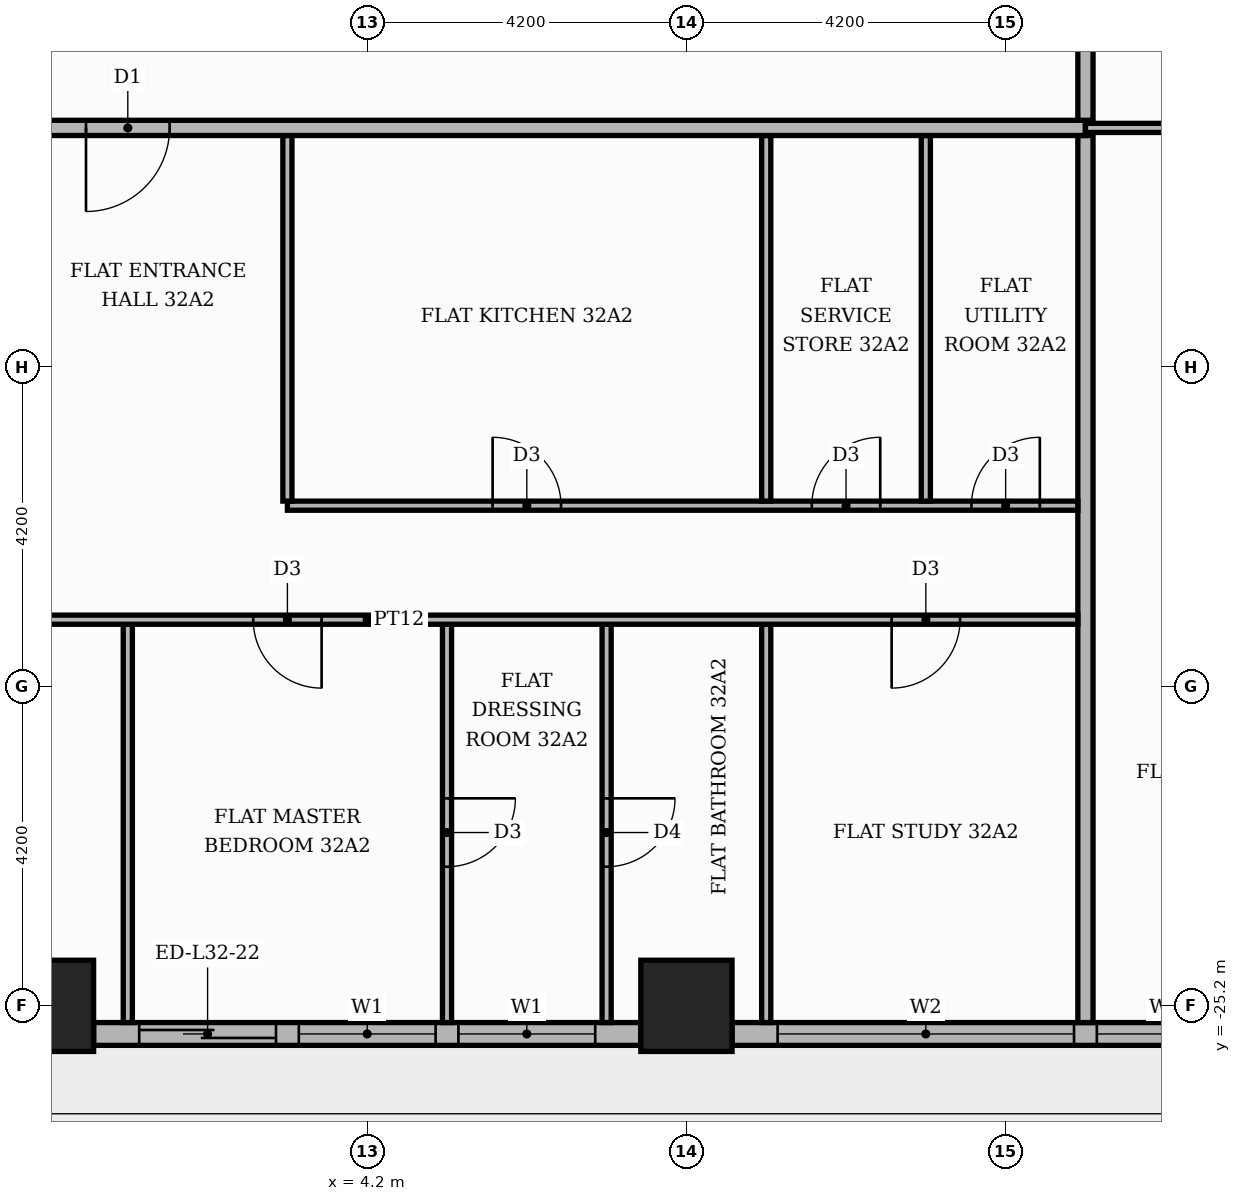
"""IFC4 building model, lengths in metres.
Left out: names, types, materials, properties, quantities, classifications, styles, units other than length and angle.
Written with IfcOpenShell. Run it as: python <this file> out.ifc"""

import sys

from ifc_helpers import new_model, si_unit, direction, frame, frame_2d, origin, origin_2d, place, context, subcontext, project, spatial, rectangle, extrude, element, fill, save


model = new_model("IFC4")
c1 = context("Model", 3, precision=1e-05, world=origin(), true_north=direction((0.0, 1.0)))
c2 = subcontext(c1, "Body", "Model", "MODEL_VIEW")
j1 = project(units=[si_unit("LENGTHUNIT", "METRE"), si_unit("PLANEANGLEUNIT", "RADIAN")], contexts=[c1])
p1 = place(None, origin())
s1 = spatial("IfcSite", under=j1, at=p1, CompositionType="ELEMENT")
p2 = place(p1, origin())
s2 = spatial("IfcBuilding", under=s1, at=p2, CompositionType="ELEMENT")
p3 = place(p2, frame((0.0, 0.0, 137.7)))
s3 = spatial("IfcBuildingStorey", under=s2, at=p3, CompositionType="ELEMENT", Elevation=137.7)
for number, where, z_axis, x_axis in (
    (1, (0.0, -25.2, 0.0), (0.0, 0.0, 1.0), (1.0, 0.0, 0.0)),
    (2, (8.4, -25.2, 0.0), (0.0, 0.0, 1.0), (1.0, 0.0, 0.0)),
):
    element("IfcColumn", number, at=place(p3, frame(where, z_axis=z_axis, x_axis=x_axis)), inside=s3, PredefinedType="COLUMN", context=c2, shape_type="SweptSolid", body=[
        extrude(rectangle(XDim=1.2, YDim=1.2, at=origin_2d()), origin(), (0.0, 0.0, 1.0), 3.9),
    ])
p4 = place(p3, frame((0.6, -25.57, 0.0), z_axis=(0.0, 0.0, 1.0), x_axis=(1.0, 0.0, 0.0)))
e3 = element("IfcWall", 3, at=p4, inside=s3, PredefinedType="STANDARD", context=c2, shape_type="SweptSolid", body=[
    extrude(rectangle(XDim=7.2, YDim=0.3, at=frame_2d((3.6, 0.0))), origin(), (0.0, 0.0, 1.0), 3.48),
])
p5 = place(p4, frame((0.6, 0.0, 0.0)))
e4 = element("IfcOpeningElement", 4, at=p5, cuts=e3, PredefinedType="OPENING", context=c2, shape_type="SweptSolid", body=[
    extrude(rectangle(XDim=1.8, YDim=2.4, at=frame_2d((0.9, 1.2))), frame((0.0, 0.16, 0.0), z_axis=(0.0, -1.0, 0.0), x_axis=(1.0, 0.0, 0.0)), (0.0, 0.0, 1.0), 0.32),
])
p6 = place(p4, frame((2.7, 0.0, 0.9)))
e5 = element("IfcOpeningElement", 5, at=p6, cuts=e3, PredefinedType="OPENING", context=c2, shape_type="SweptSolid", body=[
    extrude(rectangle(XDim=1.8, YDim=2.1, at=frame_2d((0.9, 1.05))), frame((0.0, 0.16, 0.0), z_axis=(0.0, -1.0, 0.0), x_axis=(1.0, 0.0, 0.0)), (0.0, 0.0, 1.0), 0.32),
])
p7 = place(p4, frame((4.8, 0.0, 0.9)))
e6 = element("IfcOpeningElement", 6, at=p7, cuts=e3, PredefinedType="OPENING", context=c2, shape_type="SweptSolid", body=[
    extrude(rectangle(XDim=1.8, YDim=2.1, at=frame_2d((0.9, 1.05))), frame((0.0, 0.16, 0.0), z_axis=(0.0, -1.0, 0.0), x_axis=(1.0, 0.0, 0.0)), (0.0, 0.0, 1.0), 0.32),
])
p8 = place(p3, frame((9.0, -25.57, 0.0), z_axis=(0.0, 0.0, 1.0), x_axis=(1.0, 0.0, 0.0)))
e7 = element("IfcWall", 7, at=p8, inside=s3, PredefinedType="STANDARD", context=c2, shape_type="SweptSolid", body=[
    extrude(rectangle(XDim=7.2, YDim=0.3, at=frame_2d((3.6, 0.0))), origin(), (0.0, 0.0, 1.0), 3.48),
])
p9 = place(p8, frame((0.6, 0.0, 0.9)))
e8 = element("IfcOpeningElement", 8, at=p9, cuts=e7, PredefinedType="OPENING", context=c2, shape_type="SweptSolid", body=[
    extrude(rectangle(XDim=3.9, YDim=2.1, at=frame_2d((1.95, 1.05))), frame((0.0, 0.16, 0.0), z_axis=(0.0, -1.0, 0.0), x_axis=(1.0, 0.0, 0.0)), (0.0, 0.0, 1.0), 0.32),
])
p10 = place(p8, frame((4.8, 0.0, 0.9)))
e9 = element("IfcOpeningElement", 9, at=p10, cuts=e7, PredefinedType="OPENING", context=c2, shape_type="SweptSolid", body=[
    extrude(rectangle(XDim=1.8, YDim=2.1, at=frame_2d((0.9, 1.05))), frame((0.0, 0.16, 0.0), z_axis=(0.0, -1.0, 0.0), x_axis=(1.0, 0.0, 0.0)), (0.0, 0.0, 1.0), 0.32),
])
p11 = place(p3, frame((1.05, -25.42, 0.0), z_axis=(0.0, 0.0, 1.0), x_axis=(0.0, 1.0, 0.0)))
e10 = element("IfcWall", 10, at=p11, inside=s3, PredefinedType="PARTITIONING", context=c2, shape_type="SweptSolid", body=[
    extrude(rectangle(XDim=5.24, YDim=0.12, at=frame_2d((2.62, 0.0))), origin(), (0.0, 0.0, 1.0), 3.48),
])
p12 = place(p3, frame((5.25, -25.42, 0.0), z_axis=(0.0, 0.0, 1.0), x_axis=(0.0, 1.0, 0.0)))
e11 = element("IfcWall", 11, at=p12, inside=s3, PredefinedType="PARTITIONING", context=c2, shape_type="SweptSolid", body=[
    extrude(rectangle(XDim=5.24, YDim=0.12, at=frame_2d((2.62, 0.0))), origin(), (0.0, 0.0, 1.0), 3.48),
])
p13 = place(p12, frame((2.05, 0.0, 0.0)))
e12 = element("IfcOpeningElement", 12, at=p13, cuts=e11, PredefinedType="OPENING", context=c2, shape_type="SweptSolid", body=[
    extrude(rectangle(XDim=0.9, YDim=2.1, at=frame_2d((0.45, 1.05))), frame((0.0, 0.07, 0.0), z_axis=(0.0, -1.0, 0.0), x_axis=(1.0, 0.0, 0.0)), (0.0, 0.0, 1.0), 0.14),
])
p14 = place(p3, frame((7.35, -25.42, 0.0), z_axis=(0.0, 0.0, 1.0), x_axis=(0.0, 1.0, 0.0)))
e13 = element("IfcWall", 13, at=p14, inside=s3, PredefinedType="PARTITIONING", context=c2, shape_type="SweptSolid", body=[
    extrude(rectangle(XDim=5.24, YDim=0.12, at=frame_2d((2.62, 0.0))), origin(), (0.0, 0.0, 1.0), 3.48),
])
p15 = place(p14, frame((2.05, 0.0, 0.0)))
e14 = element("IfcOpeningElement", 14, at=p15, cuts=e13, PredefinedType="OPENING", context=c2, shape_type="SweptSolid", body=[
    extrude(rectangle(XDim=0.9, YDim=2.1, at=frame_2d((0.45, 1.05))), frame((0.0, 0.07, 0.0), z_axis=(0.0, -1.0, 0.0), x_axis=(1.0, 0.0, 0.0)), (0.0, 0.0, 1.0), 0.14),
])
p16 = place(p3, frame((9.45, -25.42, 0.0), z_axis=(0.0, 0.0, 1.0), x_axis=(0.0, 1.0, 0.0)))
e15 = element("IfcWall", 15, at=p16, inside=s3, PredefinedType="PARTITIONING", context=c2, shape_type="SweptSolid", body=[
    extrude(rectangle(XDim=5.24, YDim=0.12, at=frame_2d((2.62, 0.0))), origin(), (0.0, 0.0, 1.0), 3.48),
])
p17 = place(p3, frame((13.65, -25.42, 0.0), z_axis=(0.0, 0.0, 1.0), x_axis=(0.0, 1.0, 0.0)))
e16 = element("IfcWall", 16, at=p17, inside=s3, PredefinedType="PARTITIONING", context=c2, shape_type="SweptSolid", body=[
    extrude(rectangle(XDim=11.67, YDim=0.2, at=frame_2d((5.835, 0.0))), origin(), (0.0, 0.0, 1.0), 3.48),
])
p18 = place(p3, frame((-5.15, -20.12, 0.0), z_axis=(0.0, 0.0, 1.0), x_axis=(1.0, 0.0, 0.0)))
e17 = element("IfcWall", 17, at=p18, inside=s3, PredefinedType="PARTITIONING", context=c2, shape_type="SweptSolid", body=[
    extrude(rectangle(XDim=18.7, YDim=0.12, at=frame_2d((9.35, 0.0))), origin(), (0.0, 0.0, 1.0), 3.48),
])
p19 = place(p18, frame((2.55, 0.0, 0.0)))
e18 = element("IfcOpeningElement", 18, at=p19, cuts=e17, PredefinedType="OPENING", context=c2, shape_type="SweptSolid", body=[
    extrude(rectangle(XDim=1.0, YDim=2.1, at=frame_2d((0.5, 1.05))), frame((0.0, 0.07, 0.0), z_axis=(0.0, -1.0, 0.0), x_axis=(1.0, 0.0, 0.0)), (0.0, 0.0, 1.0), 0.14),
])
p20 = place(p18, frame((7.85, 0.0, 0.0)))
e19 = element("IfcOpeningElement", 19, at=p20, cuts=e17, PredefinedType="OPENING", context=c2, shape_type="SweptSolid", body=[
    extrude(rectangle(XDim=0.9, YDim=2.1, at=frame_2d((0.45, 1.05))), frame((0.0, 0.07, 0.0), z_axis=(0.0, -1.0, 0.0), x_axis=(1.0, 0.0, 0.0)), (0.0, 0.0, 1.0), 0.14),
])
p21 = place(p18, frame((16.25, 0.0, 0.0)))
e20 = element("IfcOpeningElement", 20, at=p21, cuts=e17, PredefinedType="OPENING", context=c2, shape_type="SweptSolid", body=[
    extrude(rectangle(XDim=0.9, YDim=2.1, at=frame_2d((0.45, 1.05))), frame((0.0, 0.07, 0.0), z_axis=(0.0, -1.0, 0.0), x_axis=(1.0, 0.0, 0.0)), (0.0, 0.0, 1.0), 0.14),
])
p22 = place(p3, frame((3.15, -18.62, 0.0), z_axis=(0.0, 0.0, 1.0), x_axis=(1.0, 0.0, 0.0)))
e21 = element("IfcWall", 21, at=p22, inside=s3, PredefinedType="PARTITIONING", context=c2, shape_type="SweptSolid", body=[
    extrude(rectangle(XDim=10.4, YDim=0.12, at=frame_2d((5.2, 0.0))), origin(), (0.0, 0.0, 1.0), 3.48),
])
p23 = place(p22, frame((2.7, 0.0, 0.0)))
e22 = element("IfcOpeningElement", 22, at=p23, cuts=e21, PredefinedType="OPENING", context=c2, shape_type="SweptSolid", body=[
    extrude(rectangle(XDim=0.9, YDim=2.1, at=frame_2d((0.45, 1.05))), frame((0.0, 0.07, 0.0), z_axis=(0.0, -1.0, 0.0), x_axis=(1.0, 0.0, 0.0)), (0.0, 0.0, 1.0), 0.14),
])
p24 = place(p22, frame((6.9, 0.0, 0.0)))
e23 = element("IfcOpeningElement", 23, at=p24, cuts=e21, PredefinedType="OPENING", context=c2, shape_type="SweptSolid", body=[
    extrude(rectangle(XDim=0.9, YDim=2.1, at=frame_2d((0.45, 1.05))), frame((0.0, 0.07, 0.0), z_axis=(0.0, -1.0, 0.0), x_axis=(1.0, 0.0, 0.0)), (0.0, 0.0, 1.0), 0.14),
])
p25 = place(p22, frame((9.0, 0.0, 0.0)))
e24 = element("IfcOpeningElement", 24, at=p25, cuts=e21, PredefinedType="OPENING", context=c2, shape_type="SweptSolid", body=[
    extrude(rectangle(XDim=0.9, YDim=2.1, at=frame_2d((0.45, 1.05))), frame((0.0, 0.07, 0.0), z_axis=(0.0, -1.0, 0.0), x_axis=(1.0, 0.0, 0.0)), (0.0, 0.0, 1.0), 0.14),
])
for number, where, z_axis, x_axis in (
    (25, (3.15, -18.56, 0.0), (0.0, 0.0, 1.0), (0.0, 1.0, 0.0)),
    (26, (9.45, -18.56, 0.0), (0.0, 0.0, 1.0), (0.0, 1.0, 0.0)),
    (27, (11.55, -18.56, 0.0), (0.0, 0.0, 1.0), (0.0, 1.0, 0.0)),
):
    element("IfcWall", number, at=place(p3, frame(where, z_axis=z_axis, x_axis=x_axis)), inside=s3, PredefinedType="PARTITIONING", context=c2, shape_type="SweptSolid", body=[
        extrude(rectangle(XDim=4.81, YDim=0.12, at=frame_2d((2.405, 0.0))), origin(), (0.0, 0.0, 1.0), 3.48),
    ])
p26 = place(p3, frame((-25.42, -13.65, 0.0), z_axis=(0.0, 0.0, 1.0), x_axis=(1.0, 0.0, 0.0)))
e28 = element("IfcWall", 28, at=p26, inside=s3, PredefinedType="PARTITIONING", context=c2, shape_type="SweptSolid", body=[
    extrude(rectangle(XDim=39.07, YDim=0.2, at=frame_2d((19.535, 0.0))), origin(), (0.0, 0.0, 1.0), 3.48),
])
p27 = place(p26, frame((13.32, 0.0, 0.0)))
e29 = element("IfcOpeningElement", 29, at=p27, cuts=e28, PredefinedType="OPENING", context=c2, shape_type="SweptSolid", body=[
    extrude(rectangle(XDim=1.1, YDim=2.4, at=frame_2d((0.55, 1.2))), frame((0.0, 0.11, 0.0), z_axis=(0.0, -1.0, 0.0), x_axis=(1.0, 0.0, 0.0)), (0.0, 0.0, 1.0), 0.22),
])
p28 = place(p26, frame((25.92, 0.0, 0.0)))
e30 = element("IfcOpeningElement", 30, at=p28, cuts=e28, PredefinedType="OPENING", context=c2, shape_type="SweptSolid", body=[
    extrude(rectangle(XDim=1.1, YDim=2.4, at=frame_2d((0.55, 1.2))), frame((0.0, 0.11, 0.0), z_axis=(0.0, -1.0, 0.0), x_axis=(1.0, 0.0, 0.0)), (0.0, 0.0, 1.0), 0.22),
])
p29 = place(p3, frame((13.65, -13.65, 0.0), z_axis=(0.0, 0.0, 1.0), x_axis=(1.0, 0.0, 0.0)))
e31 = element("IfcWall", 31, at=p29, inside=s3, PredefinedType="PARTITIONING", context=c2, shape_type="SweptSolid", body=[
    extrude(rectangle(XDim=7.07, YDim=0.12, at=frame_2d((3.535, 0.0))), origin(), (0.0, 0.0, 1.0), 3.48),
])
p30 = place(p29, frame((3.085, 0.0, 0.0)))
e32 = element("IfcOpeningElement", 32, at=p30, cuts=e31, PredefinedType="OPENING", context=c2, shape_type="SweptSolid", body=[
    extrude(rectangle(XDim=0.9, YDim=2.1, at=frame_2d((0.45, 1.05))), frame((0.0, 0.07, 0.0), z_axis=(0.0, -1.0, 0.0), x_axis=(1.0, 0.0, 0.0)), (0.0, 0.0, 1.0), 0.14),
])
p31 = place(p3, frame((13.65, -13.55, 0.0), z_axis=(0.0, 0.0, 1.0), x_axis=(0.0, 1.0, 0.0)))
e33 = element("IfcWall", 33, at=p31, inside=s3, PredefinedType="PARTITIONING", context=c2, shape_type="SweptSolid", body=[
    extrude(rectangle(XDim=2.45, YDim=0.2, at=frame_2d((1.225, 0.0))), origin(), (0.0, 0.0, 1.0), 3.48),
])
p32 = place(p5, origin())
e34 = element("IfcDoor", 34, at=p32, inside=s3, OperationType="SLIDING_TO_LEFT", PredefinedType="DOOR", context=c2, shape_type="SweptSolid", body=[
    extrude(rectangle(XDim=1.8, YDim=2.4, at=frame_2d((0.9, 1.2))), frame((0.0, 0.025, 0.0), z_axis=(0.0, -1.0, 0.0), x_axis=(1.0, 0.0, 0.0)), (0.0, 0.0, 1.0), 0.05),
])
fill(e4, e34)
p33 = place(p6, origin())
e35 = element("IfcWindow", 35, at=p33, inside=s3, PartitioningType="SINGLE_PANEL", PredefinedType="WINDOW", context=c2, shape_type="SweptSolid", body=[
    extrude(rectangle(XDim=1.8, YDim=2.1, at=frame_2d((0.9, 1.05))), frame((0.0, 0.03, 0.0), z_axis=(0.0, -1.0, 0.0), x_axis=(1.0, 0.0, 0.0)), (0.0, 0.0, 1.0), 0.06),
])
fill(e5, e35)
p34 = place(p7, origin())
e36 = element("IfcWindow", 36, at=p34, inside=s3, PartitioningType="SINGLE_PANEL", PredefinedType="WINDOW", context=c2, shape_type="SweptSolid", body=[
    extrude(rectangle(XDim=1.8, YDim=2.1, at=frame_2d((0.9, 1.05))), frame((0.0, 0.03, 0.0), z_axis=(0.0, -1.0, 0.0), x_axis=(1.0, 0.0, 0.0)), (0.0, 0.0, 1.0), 0.06),
])
fill(e6, e36)
p35 = place(p9, origin())
e37 = element("IfcWindow", 37, at=p35, inside=s3, PartitioningType="SINGLE_PANEL", PredefinedType="WINDOW", context=c2, shape_type="SweptSolid", body=[
    extrude(rectangle(XDim=3.9, YDim=2.1, at=frame_2d((1.95, 1.05))), frame((0.0, 0.03, 0.0), z_axis=(0.0, -1.0, 0.0), x_axis=(1.0, 0.0, 0.0)), (0.0, 0.0, 1.0), 0.06),
])
fill(e8, e37)
p36 = place(p10, origin())
e38 = element("IfcWindow", 38, at=p36, inside=s3, PartitioningType="SINGLE_PANEL", PredefinedType="WINDOW", context=c2, shape_type="SweptSolid", body=[
    extrude(rectangle(XDim=1.8, YDim=2.1, at=frame_2d((0.9, 1.05))), frame((0.0, 0.03, 0.0), z_axis=(0.0, -1.0, 0.0), x_axis=(1.0, 0.0, 0.0)), (0.0, 0.0, 1.0), 0.06),
])
fill(e9, e38)
p37 = place(p28, frame((1.1, 0.0, 0.0), z_axis=(0.0, 0.0, 1.0), x_axis=(-1.0, 0.0, 0.0)))
e39 = element("IfcDoor", 39, at=p37, inside=s3, OperationType="SINGLE_SWING_LEFT", PredefinedType="DOOR", context=c2, shape_type="SweptSolid", body=[
    extrude(rectangle(XDim=1.1, YDim=2.4, at=frame_2d((0.55, 1.2))), frame((0.0, 0.025, 0.0), z_axis=(0.0, -1.0, 0.0), x_axis=(1.0, 0.0, 0.0)), (0.0, 0.0, 1.0), 0.05),
])
fill(e30, e39)
p38 = place(p23, origin())
e40 = element("IfcDoor", 40, at=p38, inside=s3, OperationType="SINGLE_SWING_LEFT", PredefinedType="DOOR", context=c2, shape_type="SweptSolid", body=[
    extrude(rectangle(XDim=0.9, YDim=2.1, at=frame_2d((0.45, 1.05))), frame((0.0, 0.025, 0.0), z_axis=(0.0, -1.0, 0.0), x_axis=(1.0, 0.0, 0.0)), (0.0, 0.0, 1.0), 0.05),
])
fill(e22, e40)
p39 = place(p24, origin())
e41 = element("IfcDoor", 41, at=p39, inside=s3, OperationType="SINGLE_SWING_RIGHT", PredefinedType="DOOR", context=c2, shape_type="SweptSolid", body=[
    extrude(rectangle(XDim=0.9, YDim=2.1, at=frame_2d((0.45, 1.05))), frame((0.0, 0.025, 0.0), z_axis=(0.0, -1.0, 0.0), x_axis=(1.0, 0.0, 0.0)), (0.0, 0.0, 1.0), 0.05),
])
fill(e23, e41)
p40 = place(p25, origin())
e42 = element("IfcDoor", 42, at=p40, inside=s3, OperationType="SINGLE_SWING_RIGHT", PredefinedType="DOOR", context=c2, shape_type="SweptSolid", body=[
    extrude(rectangle(XDim=0.9, YDim=2.1, at=frame_2d((0.45, 1.05))), frame((0.0, 0.025, 0.0), z_axis=(0.0, -1.0, 0.0), x_axis=(1.0, 0.0, 0.0)), (0.0, 0.0, 1.0), 0.05),
])
fill(e24, e42)
p41 = place(p20, frame((0.9, 0.0, 0.0), z_axis=(0.0, 0.0, 1.0), x_axis=(-1.0, 0.0, 0.0)))
e43 = element("IfcDoor", 43, at=p41, inside=s3, OperationType="SINGLE_SWING_RIGHT", PredefinedType="DOOR", context=c2, shape_type="SweptSolid", body=[
    extrude(rectangle(XDim=0.9, YDim=2.1, at=frame_2d((0.45, 1.05))), frame((0.0, 0.025, 0.0), z_axis=(0.0, -1.0, 0.0), x_axis=(1.0, 0.0, 0.0)), (0.0, 0.0, 1.0), 0.05),
])
fill(e19, e43)
p42 = place(p13, frame((0.9, 0.0, 0.0), z_axis=(0.0, 0.0, 1.0), x_axis=(-1.0, 0.0, 0.0)))
e44 = element("IfcDoor", 44, at=p42, inside=s3, OperationType="SINGLE_SWING_RIGHT", PredefinedType="DOOR", context=c2, shape_type="SweptSolid", body=[
    extrude(rectangle(XDim=0.9, YDim=2.1, at=frame_2d((0.45, 1.05))), frame((0.0, 0.025, 0.0), z_axis=(0.0, -1.0, 0.0), x_axis=(1.0, 0.0, 0.0)), (0.0, 0.0, 1.0), 0.05),
])
fill(e12, e44)
p43 = place(p15, frame((0.9, 0.0, 0.0), z_axis=(0.0, 0.0, 1.0), x_axis=(-1.0, 0.0, 0.0)))
e45 = element("IfcDoor", 45, at=p43, inside=s3, OperationType="SINGLE_SWING_RIGHT", PredefinedType="DOOR", context=c2, shape_type="SweptSolid", body=[
    extrude(rectangle(XDim=0.9, YDim=2.1, at=frame_2d((0.45, 1.05))), frame((0.0, 0.025, 0.0), z_axis=(0.0, -1.0, 0.0), x_axis=(1.0, 0.0, 0.0)), (0.0, 0.0, 1.0), 0.05),
])
fill(e14, e45)
p44 = place(p21, frame((0.9, 0.0, 0.0), z_axis=(0.0, 0.0, 1.0), x_axis=(-1.0, 0.0, 0.0)))
e46 = element("IfcDoor", 46, at=p44, inside=s3, OperationType="SINGLE_SWING_LEFT", PredefinedType="DOOR", context=c2, shape_type="SweptSolid", body=[
    extrude(rectangle(XDim=0.9, YDim=2.1, at=frame_2d((0.45, 1.05))), frame((0.0, 0.025, 0.0), z_axis=(0.0, -1.0, 0.0), x_axis=(1.0, 0.0, 0.0)), (0.0, 0.0, 1.0), 0.05),
])
fill(e20, e46)
save(model, sys.argv[1])
